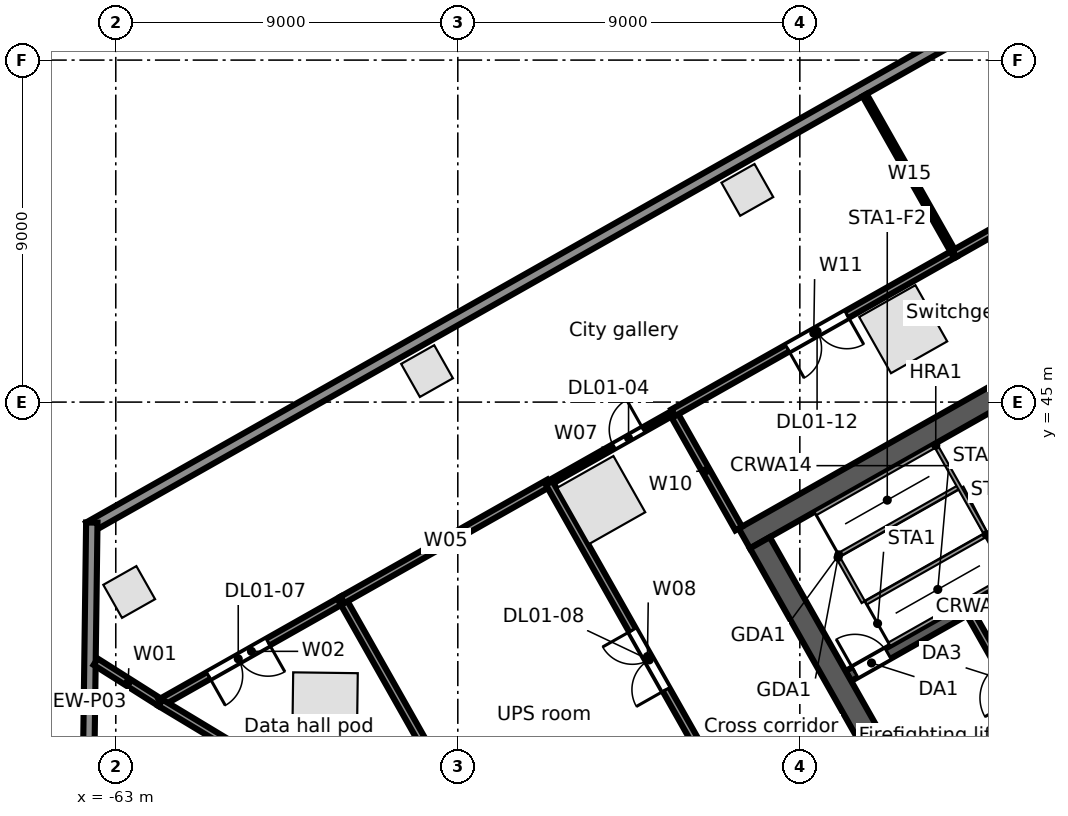
"""IFC4 building model, lengths in metres.
Left out: names, types, materials, properties, quantities, classifications, styles, units other than length and angle.
Written with IfcOpenShell. Run it as: python <this file> out.ifc"""

import sys

from ifc_helpers import new_model, si_unit, direction, frame, frame_2d, origin, origin_2d, place, context, subcontext, project, spatial, rectangle, extrude, element, fill, save


model = new_model("IFC4")
c1 = context("Model", 3, precision=1e-05, world=origin(), true_north=direction((0.0, 1.0)))
c2 = subcontext(c1, "Body", "Model", "MODEL_VIEW")
j1 = project(units=[si_unit("LENGTHUNIT", "METRE"), si_unit("PLANEANGLEUNIT", "RADIAN")], contexts=[c1])
p1 = place(None, origin())
s1 = spatial("IfcSite", under=j1, at=p1, CompositionType="ELEMENT")
p2 = place(p1, origin())
s2 = spatial("IfcBuilding", under=s1, at=p2, CompositionType="ELEMENT")
p3 = place(p2, frame((0.0, 0.0, 11.5)))
s3 = spatial("IfcBuildingStorey", under=s2, at=p3, CompositionType="ELEMENT", Elevation=11.5)
for number, where, z_axis, x_axis in (
    (1, (-42.28, 46.919, 0.0), (0.0, 0.0, 1.0), (-0.87, -0.492, 0.0)),
    (2, (-50.226, 42.423, 0.0), (0.0, 0.0, 1.0), (-0.87, -0.492, 0.0)),
    (3, (-57.493, 37.027, 0.0), (0.0, 0.0, 1.0), (-0.013, -1.0, 0.0)),
):
    element("IfcColumn", number, at=place(p3, frame(where, z_axis=z_axis, x_axis=x_axis)), inside=s3, PredefinedType="COLUMN", context=c2, shape_type="SweptSolid", body=[
        extrude(rectangle(XDim=1.7, YDim=1.7, at=origin_2d()), origin(), (0.0, 0.0, 1.0), 5.0),
    ])
for number, where, z_axis, x_axis in (
    (4, (-46.381, 50.584, 0.0), (0.0, 0.0, 1.0), (-0.87, -0.492, 0.0)),
    (5, (-54.81, 45.816, 0.0), (0.0, 0.0, 1.0), (-0.87, -0.492, 0.0)),
    (6, (-62.647, 40.003, 0.0), (0.0, 0.0, 1.0), (-0.87, -0.492, 0.0)),
):
    element("IfcColumn", number, at=place(p3, frame(where, z_axis=z_axis, x_axis=x_axis)), inside=s3, PredefinedType="COLUMN", context=c2, shape_type="SweptSolid", body=[
        extrude(rectangle(XDim=1.0, YDim=1.0, at=origin_2d()), origin(), (0.0, 0.0, 1.0), 5.0),
    ])
p4 = place(p3, frame((-63.707, 41.701, 0.0), z_axis=(0.0, 0.0, 1.0), x_axis=(0.870355510268, 0.492423888277, 0.0)))
e7 = element("IfcWall", 7, at=p4, inside=s3, PredefinedType="STANDARD", context=c2, shape_type="SweptSolid", body=[
    extrude(rectangle(XDim=67.903, YDim=0.3, at=frame_2d((33.952, 0.0))), origin(), (0.0, 0.0, 1.0), 4.65),
])
p5 = place(p3, frame((-63.754, 32.387, 0.0), z_axis=(0.0, 0.0, 1.0), x_axis=(0.013081929375, 0.999914427901, 0.0)))
e8 = element("IfcWall", 8, at=p5, inside=s3, PredefinedType="STANDARD", context=c2, shape_type="SweptSolid", body=[
    extrude(rectangle(XDim=9.443, YDim=0.3, at=frame_2d((4.722, 0.0))), origin(), (0.0, 0.0, 1.0), 4.65),
])
p6 = place(p3, frame((-41.556, 33.961, 0.0), z_axis=(0.0, 0.0, 1.0), x_axis=(0.870343731308, 0.492444706919, 0.0)))
e9 = element("IfcWall", 9, at=p6, inside=s3, PredefinedType="SOLIDWALL", context=c2, shape_type="SweptSolid", body=[
    extrude(rectangle(XDim=6.0, YDim=0.3, at=frame_2d((3.0, 0.0))), origin(), (0.0, 0.0, 1.0), 4.65),
])
p7 = place(p6, frame((1.1, 0.0, 0.0)))
e10 = element("IfcOpeningElement", 10, at=p7, cuts=e9, PredefinedType="OPENING", context=c2, shape_type="SweptSolid", body=[
    extrude(rectangle(XDim=1.1, YDim=2.1, at=frame_2d((0.55, 1.05))), frame((0.0, 0.16, 0.0), z_axis=(0.0, -1.0, 0.0), x_axis=(1.0, 0.0, 0.0)), (0.0, 0.0, 1.0), 0.32),
])
p8 = place(p6, frame((4.25, 0.0, 0.0)))
e11 = element("IfcOpeningElement", 11, at=p8, cuts=e9, PredefinedType="OPENING", context=c2, shape_type="SweptSolid", body=[
    extrude(rectangle(XDim=1.1, YDim=2.1, at=frame_2d((0.55, 1.05))), frame((0.0, 0.16, 0.0), z_axis=(0.0, -1.0, 0.0), x_axis=(1.0, 0.0, 0.0)), (0.0, 0.0, 1.0), 0.32),
])
p9 = place(p3, frame((-43.723, 37.791, 0.0), z_axis=(0.0, 0.0, 1.0), x_axis=(0.87035077051, 0.49243226567, 0.0)))
e12 = element("IfcWall", 12, at=p9, inside=s3, PredefinedType="SOLIDWALL", context=c2, shape_type="SweptSolid", body=[
    extrude(rectangle(XDim=7.4, YDim=0.3, at=frame_2d((3.7, 0.0))), origin(), (0.0, 0.0, 1.0), 4.65),
])
p10 = place(p9, frame((0.2, 0.0, 0.0)))
e13 = element("IfcOpeningElement", 13, at=p10, cuts=e12, PredefinedType="OPENING", context=c2, shape_type="SweptSolid", body=[
    extrude(rectangle(XDim=1.0, YDim=2.1, at=frame_2d((0.5, 1.05))), frame((0.0, 0.16, 0.0), z_axis=(0.0, -1.0, 0.0), x_axis=(1.0, 0.0, 0.0)), (0.0, 0.0, 1.0), 0.32),
])
p11 = place(p3, frame((-46.461, 41.412, 0.0), z_axis=(0.0, 0.0, 1.0), x_axis=(0.870350116061, 0.492433422375, 0.0)))
e14 = element("IfcWall", 14, at=p11, inside=s3, PredefinedType="SOLIDWALL", context=c2, shape_type="SweptSolid", body=[
    extrude(rectangle(XDim=17.0, YDim=0.6, at=frame_2d((8.5, 0.0))), origin(), (0.0, 0.0, 1.0), 4.65),
])
p12 = place(p3, frame((-46.052, 41.298, 0.0), z_axis=(0.0, 0.0, 1.0), x_axis=(0.492418598281, -0.870358503186, 0.0)))
e15 = element("IfcWall", 15, at=p12, inside=s3, PredefinedType="SOLIDWALL", context=c2, shape_type="SweptSolid", body=[
    extrude(rectangle(XDim=12.8, YDim=0.6, at=frame_2d((6.4, 0.0))), origin(), (0.0, 0.0, 1.0), 4.65),
])
p13 = place(p3, frame((-40.516, 39.433, 0.0), z_axis=(0.0, 0.0, 1.0), x_axis=(0.492453559952, -0.87033872216, 0.0)))
e16 = element("IfcWall", 16, at=p13, inside=s3, PredefinedType="PARTITIONING", context=c2, shape_type="SweptSolid", body=[
    extrude(rectangle(XDim=4.1, YDim=0.2, at=frame_2d((2.05, 0.0))), origin(), (0.0, 0.0, 1.0), 4.65),
])
p14 = place(p13, frame((1.55, 0.0, 0.0)))
e17 = element("IfcOpeningElement", 17, at=p14, cuts=e16, PredefinedType="OPENING", context=c2, shape_type="SweptSolid", body=[
    extrude(rectangle(XDim=1.0, YDim=2.1, at=frame_2d((0.5, 1.05))), frame((0.0, 0.11, 0.0), z_axis=(0.0, -1.0, 0.0), x_axis=(1.0, 0.0, 0.0)), (0.0, 0.0, 1.0), 0.22),
])
p15 = place(p3, frame((-63.529, 38.167, 0.0), z_axis=(0.0, 0.0, 1.0), x_axis=(0.844913795328, -0.534902494352, 0.0)))
e18 = element("IfcWall", 18, at=p15, inside=s3, PredefinedType="PARTITIONING", context=c2, shape_type="SweptSolid", body=[
    extrude(rectangle(XDim=2.019, YDim=0.2, at=frame_2d((1.01, 0.0))), origin(), (0.0, 0.0, 1.0), 4.13),
])
p16 = place(p3, frame((-61.823, 37.087, 0.0), z_axis=(0.0, 0.0, 1.0), x_axis=(0.870387515286, 0.492367315359, 0.0)))
e19 = element("IfcWall", 19, at=p16, inside=s3, PredefinedType="PARTITIONING", context=c2, shape_type="SweptSolid", body=[
    extrude(rectangle(XDim=5.5, YDim=0.2, at=frame_2d((2.75, 0.0))), origin(), (0.0, 0.0, 1.0), 3.83),
])
p17 = place(p16, frame((1.45, 0.0, 0.0)))
e20 = element("IfcOpeningElement", 20, at=p17, cuts=e19, PredefinedType="OPENING", context=c2, shape_type="SweptSolid", body=[
    extrude(rectangle(XDim=1.8, YDim=2.1, at=frame_2d((0.9, 1.05))), frame((0.0, 0.11, 0.0), z_axis=(0.0, -1.0, 0.0), x_axis=(1.0, 0.0, 0.0)), (0.0, 0.0, 1.0), 0.22),
])
p18 = place(p3, frame((-61.823, 37.087, 0.0), z_axis=(0.0, 0.0, 1.0), x_axis=(0.85653126321, -0.516095141562, 0.0)))
e21 = element("IfcWall", 21, at=p18, inside=s3, PredefinedType="PARTITIONING", context=c2, shape_type="SweptSolid", body=[
    extrude(rectangle(XDim=11.195, YDim=0.2, at=frame_2d((5.598, 0.0))), origin(), (0.0, 0.0, 1.0), 3.822),
])
p19 = place(p3, frame((-57.036, 39.795, 0.0), z_axis=(0.0, 0.0, 1.0), x_axis=(0.492496959124, -0.870314164687, 0.0)))
e22 = element("IfcWall", 22, at=p19, inside=s3, PredefinedType="PARTITIONING", context=c2, shape_type="SweptSolid", body=[
    extrude(rectangle(XDim=9.75, YDim=0.2, at=frame_2d((4.875, 0.0))), origin(), (0.0, 0.0, 1.0), 3.822),
])
p20 = place(p3, frame((-57.036, 39.795, 0.0), z_axis=(0.0, 0.0, 1.0), x_axis=(0.870331405276, 0.492466491236, 0.0)))
e23 = element("IfcWall", 23, at=p20, inside=s3, PredefinedType="PARTITIONING", context=c2, shape_type="SweptSolid", body=[
    extrude(rectangle(XDim=6.25, YDim=0.2, at=frame_2d((3.125, 0.0))), origin(), (0.0, 0.0, 1.0), 3.83),
])
p21 = place(p3, frame((-51.596, 42.873, 0.0), z_axis=(0.0, 0.0, 1.0), x_axis=(0.87043427122, 0.492284652905, 0.0)))
e24 = element("IfcWall", 24, at=p21, inside=s3, PredefinedType="PARTITIONING", context=c2, shape_type="SweptSolid", body=[
    extrude(rectangle(XDim=3.75, YDim=0.125, at=frame_2d((1.875, 0.0))), origin(), (0.0, 0.0, 1.0), 4.65),
])
p22 = place(p21, frame((1.95, 0.0, 0.0)))
e25 = element("IfcOpeningElement", 25, at=p22, cuts=e24, PredefinedType="OPENING", context=c2, shape_type="SweptSolid", body=[
    extrude(rectangle(XDim=0.9, YDim=2.1, at=frame_2d((0.45, 1.05))), frame((0.0, 0.073, 0.0), z_axis=(0.0, -1.0, 0.0), x_axis=(1.0, 0.0, 0.0)), (0.0, 0.0, 1.0), 0.145),
])
p23 = place(p3, frame((-51.596, 42.873, 0.0), z_axis=(0.0, 0.0, 1.0), x_axis=(0.492438738815, -0.870347108064, 0.0)))
e26 = element("IfcWall", 26, at=p23, inside=s3, PredefinedType="PARTITIONING", context=c2, shape_type="SweptSolid", body=[
    extrude(rectangle(XDim=10.5, YDim=0.2, at=frame_2d((5.25, 0.0))), origin(), (0.0, 0.0, 1.0), 3.712),
])
p24 = place(p23, frame((4.45, 0.0, 0.0)))
e27 = element("IfcOpeningElement", 27, at=p24, cuts=e26, PredefinedType="OPENING", context=c2, shape_type="SweptSolid", body=[
    extrude(rectangle(XDim=1.8, YDim=2.1, at=frame_2d((0.9, 1.05))), frame((0.0, 0.11, 0.0), z_axis=(0.0, -1.0, 0.0), x_axis=(1.0, 0.0, 0.0)), (0.0, 0.0, 1.0), 0.22),
])
p25 = place(p3, frame((-48.332, 44.719, 0.0), z_axis=(0.0, 0.0, 1.0), x_axis=(0.492392845909, -0.87037307248, 0.0)))
e28 = element("IfcWall", 28, at=p25, inside=s3, PredefinedType="PARTITIONING", context=c2, shape_type="SweptSolid", body=[
    extrude(rectangle(XDim=3.5, YDim=0.2, at=frame_2d((1.75, 0.0))), origin(), (0.0, 0.0, 1.0), 3.93),
])
p26 = place(p3, frame((-48.332, 44.719, 0.0), z_axis=(0.0, 0.0, 1.0), x_axis=(0.870331650579, 0.492466057713, 0.0)))
e29 = element("IfcWall", 29, at=p26, inside=s3, PredefinedType="PARTITIONING", context=c2, shape_type="SweptSolid", body=[
    extrude(rectangle(XDim=8.5, YDim=0.2, at=frame_2d((4.25, 0.0))), origin(), (0.0, 0.0, 1.0), 4.03),
])
p27 = place(p26, frame((3.45, 0.0, 0.0)))
e30 = element("IfcOpeningElement", 30, at=p27, cuts=e29, PredefinedType="OPENING", context=c2, shape_type="SweptSolid", body=[
    extrude(rectangle(XDim=1.8, YDim=2.1, at=frame_2d((0.9, 1.05))), frame((0.0, 0.11, 0.0), z_axis=(0.0, -1.0, 0.0), x_axis=(1.0, 0.0, 0.0)), (0.0, 0.0, 1.0), 0.22),
])
p28 = place(p3, frame((-43.295, 53.077, 0.0), z_axis=(0.0, 0.0, 1.0), x_axis=(0.492503605136, -0.87031040378, 0.0)))
e31 = element("IfcWall", 31, at=p28, inside=s3, PredefinedType="PARTITIONING", context=c2, shape_type="SweptSolid", body=[
    extrude(rectangle(XDim=4.793, YDim=0.125, at=frame_2d((2.397, 0.0))), origin(), (0.0, 0.0, 1.0), 3.93),
])
p29 = place(p3, frame((-40.934, 48.905, 0.0), z_axis=(0.0, 0.0, 1.0), x_axis=(0.870387854278, 0.492366716102, 0.0)))
e32 = element("IfcWall", 32, at=p29, inside=s3, PredefinedType="PARTITIONING", context=c2, shape_type="SweptSolid", body=[
    extrude(rectangle(XDim=8.5, YDim=0.2, at=frame_2d((4.25, 0.0))), origin(), (0.0, 0.0, 1.0), 4.03),
])
p30 = place(p10, origin())
e33 = element("IfcDoor", 33, at=p30, inside=s3, OperationType="SINGLE_SWING_LEFT", PredefinedType="DOOR", context=c2, shape_type="SweptSolid", body=[
    extrude(rectangle(XDim=1.0, YDim=2.1, at=frame_2d((0.5, 1.05))), frame((0.0, 0.025, 0.0), z_axis=(0.0, -1.0, 0.0), x_axis=(1.0, 0.0, 0.0)), (0.0, 0.0, 1.0), 0.05),
])
fill(e13, e33)
p31 = place(p22, origin())
e34 = element("IfcDoor", 34, at=p31, inside=s3, OperationType="SINGLE_SWING_RIGHT", PredefinedType="DOOR", context=c2, shape_type="SweptSolid", body=[
    extrude(rectangle(XDim=0.9, YDim=2.1, at=frame_2d((0.45, 1.05))), frame((0.0, 0.025, 0.0), z_axis=(0.0, -1.0, 0.0), x_axis=(1.0, 0.0, 0.0)), (0.0, 0.0, 1.0), 0.05),
])
fill(e25, e34)
p32 = place(p17, frame((1.8, 0.0, 0.0), z_axis=(0.0, 0.0, 1.0), x_axis=(-1.0, 0.0, 0.0)))
e35 = element("IfcDoor", 35, at=p32, inside=s3, OperationType="DOUBLE_DOOR_SINGLE_SWING", PredefinedType="DOOR", context=c2, shape_type="SweptSolid", body=[
    extrude(rectangle(XDim=1.8, YDim=2.1, at=frame_2d((0.9, 1.05))), frame((0.0, 0.025, 0.0), z_axis=(0.0, -1.0, 0.0), x_axis=(1.0, 0.0, 0.0)), (0.0, 0.0, 1.0), 0.05),
])
fill(e20, e35)
p33 = place(p24, frame((1.8, 0.0, 0.0), z_axis=(0.0, 0.0, 1.0), x_axis=(-1.0, 0.0, 0.0)))
e36 = element("IfcDoor", 36, at=p33, inside=s3, OperationType="DOUBLE_DOOR_SINGLE_SWING", PredefinedType="DOOR", context=c2, shape_type="SweptSolid", body=[
    extrude(rectangle(XDim=1.8, YDim=2.1, at=frame_2d((0.9, 1.05))), frame((0.0, 0.025, 0.0), z_axis=(0.0, -1.0, 0.0), x_axis=(1.0, 0.0, 0.0)), (0.0, 0.0, 1.0), 0.05),
])
fill(e27, e36)
p34 = place(p27, frame((1.8, 0.0, 0.0), z_axis=(0.0, 0.0, 1.0), x_axis=(-1.0, 0.0, 0.0)))
e37 = element("IfcDoor", 37, at=p34, inside=s3, OperationType="DOUBLE_DOOR_SINGLE_SWING", PredefinedType="DOOR", context=c2, shape_type="SweptSolid", body=[
    extrude(rectangle(XDim=1.8, YDim=2.1, at=frame_2d((0.9, 1.05))), frame((0.0, 0.025, 0.0), z_axis=(0.0, -1.0, 0.0), x_axis=(1.0, 0.0, 0.0)), (0.0, 0.0, 1.0), 0.05),
])
fill(e30, e37)
save(model, sys.argv[1])
